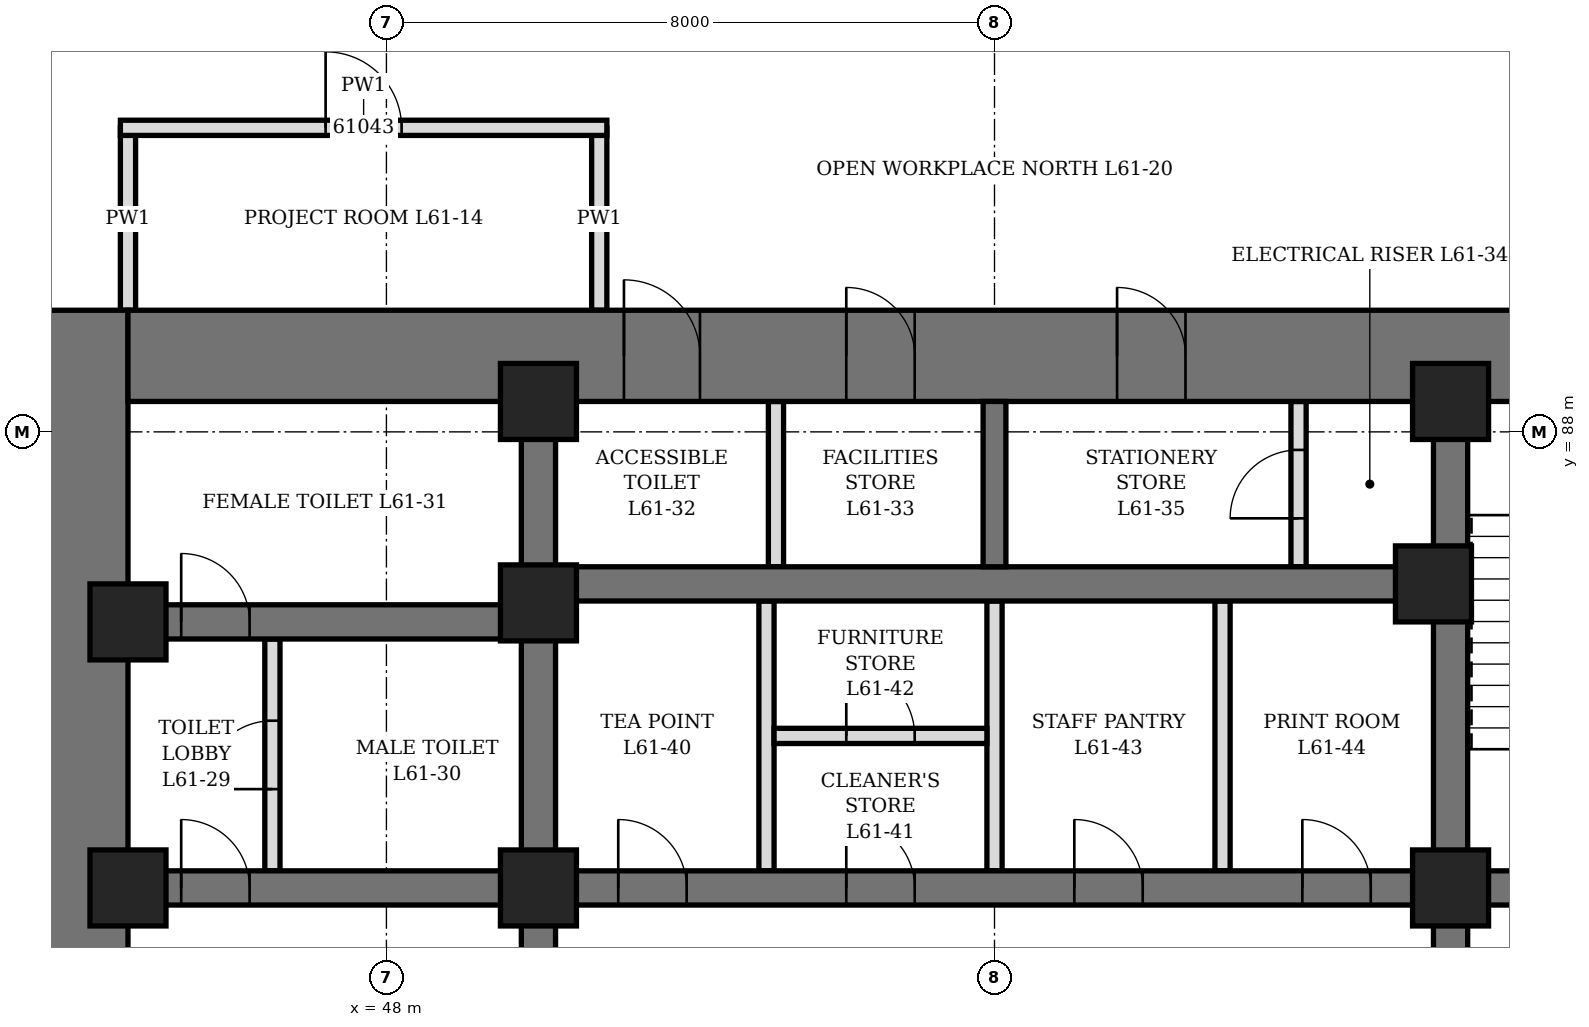
"""IFC4 building model, lengths in metres.
Left out: names, types, materials, properties, quantities, classifications, styles, units other than length and angle.
Written with IfcOpenShell. Run it as: python <this file> out.ifc"""

import sys

from ifc_helpers import new_model, si_unit, direction, frame, frame_2d, origin, origin_2d, place, context, subcontext, project, spatial, rectangle, hollow_rectangle, extrude, element, fill, save


model = new_model("IFC4")
c1 = context("Model", 3, precision=1e-05, world=origin(), true_north=direction((0.0, 1.0)))
c2 = subcontext(c1, "Body", "Model", "MODEL_VIEW")
j1 = project(units=[si_unit("LENGTHUNIT", "METRE"), si_unit("PLANEANGLEUNIT", "RADIAN")], contexts=[c1])
p1 = place(None, origin())
s1 = spatial("IfcSite", under=j1, at=p1, CompositionType="ELEMENT")
p2 = place(p1, origin())
s2 = spatial("IfcBuilding", under=s1, at=p2, CompositionType="ELEMENT")
p3 = place(p2, frame((0.0, 0.0, 271.3)))
s3 = spatial("IfcBuildingStorey", under=s2, at=p3, CompositionType="ELEMENT", Elevation=271.3)
p4 = place(p3, frame((44.0, 70.4, 0.0), z_axis=(0.0, 0.0, 1.0), x_axis=(0.0, 1.0, 0.0)))
e1 = element("IfcWall", 1, at=p4, inside=s3, PredefinedType="SHEAR", context=c2, shape_type="SweptSolid", body=[
    extrude(rectangle(XDim=19.2, YDim=1.2, at=frame_2d((9.6, 0.0))), origin(), (0.0, 0.0, 1.0), 4.2),
])
p5 = place(p4, frame((8.6, 0.0, 0.0)))
e2 = element("IfcOpeningElement", 2, at=p5, cuts=e1, PredefinedType="OPENING", context=c2, shape_type="SweptSolid", body=[
    extrude(rectangle(XDim=2.0, YDim=2.4, at=frame_2d((1.0, 1.2))), frame((0.0, 0.61, 0.0), z_axis=(0.0, -1.0, 0.0), x_axis=(1.0, 0.0, 0.0)), (0.0, 0.0, 1.0), 1.22),
])
p6 = place(p3, frame((44.6, 89.0, 0.0), z_axis=(0.0, 0.0, 1.0), x_axis=(1.0, 0.0, 0.0)))
e3 = element("IfcWall", 3, at=p6, inside=s3, PredefinedType="SHEAR", context=c2, shape_type="SweptSolid", body=[
    extrude(rectangle(XDim=22.8, YDim=1.2, at=frame_2d((11.4, 0.0))), origin(), (0.0, 0.0, 1.0), 4.2),
])
p7 = place(p6, frame((6.525, 0.0, 0.0)))
e4 = element("IfcOpeningElement", 4, at=p7, cuts=e3, PredefinedType="OPENING", context=c2, shape_type="SweptSolid", body=[
    extrude(rectangle(XDim=1.0, YDim=2.1, at=frame_2d((0.5, 1.05))), frame((0.0, 0.61, 0.0), z_axis=(0.0, -1.0, 0.0), x_axis=(1.0, 0.0, 0.0)), (0.0, 0.0, 1.0), 1.22),
])
p8 = place(p6, frame((9.45, 0.0, 0.0)))
e5 = element("IfcOpeningElement", 5, at=p8, cuts=e3, PredefinedType="OPENING", context=c2, shape_type="SweptSolid", body=[
    extrude(rectangle(XDim=0.9, YDim=2.1, at=frame_2d((0.45, 1.05))), frame((0.0, 0.61, 0.0), z_axis=(0.0, -1.0, 0.0), x_axis=(1.0, 0.0, 0.0)), (0.0, 0.0, 1.0), 1.22),
])
p9 = place(p6, frame((13.012, 0.0, 0.0)))
e6 = element("IfcOpeningElement", 6, at=p9, cuts=e3, PredefinedType="OPENING", context=c2, shape_type="SweptSolid", body=[
    extrude(rectangle(XDim=0.9, YDim=2.1, at=frame_2d((0.45, 1.05))), frame((0.0, 0.61, 0.0), z_axis=(0.0, -1.0, 0.0), x_axis=(1.0, 0.0, 0.0)), (0.0, 0.0, 1.0), 1.22),
])
p10 = place(p3, frame((50.0, 71.6, 0.0), z_axis=(0.0, 0.0, 1.0), x_axis=(0.0, 1.0, 0.0)))
e7 = element("IfcWall", 7, at=p10, inside=s3, PredefinedType="SHEAR", context=c2, shape_type="SweptSolid", body=[
    extrude(rectangle(XDim=16.8, YDim=0.45, at=frame_2d((8.4, 0.0))), origin(), (0.0, 0.0, 1.0), 4.2),
])
p11 = place(p10, frame((7.5, 0.0, 0.0)))
e8 = element("IfcOpeningElement", 8, at=p11, cuts=e7, PredefinedType="OPENING", context=c2, shape_type="SweptSolid", body=[
    extrude(rectangle(XDim=1.8, YDim=2.4, at=frame_2d((0.9, 1.2))), frame((0.0, 0.235, 0.0), z_axis=(0.0, -1.0, 0.0), x_axis=(1.0, 0.0, 0.0)), (0.0, 0.0, 1.0), 0.47),
])
p12 = place(p3, frame((62.0, 71.6, 0.0), z_axis=(0.0, 0.0, 1.0), x_axis=(0.0, 1.0, 0.0)))
e9 = element("IfcWall", 9, at=p12, inside=s3, PredefinedType="SHEAR", context=c2, shape_type="SweptSolid", body=[
    extrude(rectangle(XDim=16.8, YDim=0.45, at=frame_2d((8.4, 0.0))), origin(), (0.0, 0.0, 1.0), 4.2),
])
p13 = place(p12, frame((7.5, 0.0, 0.0)))
e10 = element("IfcOpeningElement", 10, at=p13, cuts=e9, PredefinedType="OPENING", context=c2, shape_type="SweptSolid", body=[
    extrude(rectangle(XDim=1.8, YDim=2.4, at=frame_2d((0.9, 1.2))), frame((0.0, 0.235, 0.0), z_axis=(0.0, -1.0, 0.0), x_axis=(1.0, 0.0, 0.0)), (0.0, 0.0, 1.0), 0.47),
])
p14 = place(p3, frame((44.6, 82.0, 0.0), z_axis=(0.0, 0.0, 1.0), x_axis=(1.0, 0.0, 0.0)))
e11 = element("IfcWall", 11, at=p14, inside=s3, PredefinedType="SHEAR", context=c2, shape_type="SweptSolid", body=[
    extrude(rectangle(XDim=5.175, YDim=0.45, at=frame_2d((2.587, 0.0))), origin(), (0.0, 0.0, 1.0), 4.2),
])
p15 = place(p14, frame((0.7, 0.0, 0.0)))
e12 = element("IfcOpeningElement", 12, at=p15, cuts=e11, PredefinedType="OPENING", context=c2, shape_type="SweptSolid", body=[
    extrude(rectangle(XDim=0.9, YDim=2.1, at=frame_2d((0.45, 1.05))), frame((0.0, 0.235, 0.0), z_axis=(0.0, -1.0, 0.0), x_axis=(1.0, 0.0, 0.0)), (0.0, 0.0, 1.0), 0.47),
])
p16 = place(p3, frame((44.6, 85.5, 0.0), z_axis=(0.0, 0.0, 1.0), x_axis=(1.0, 0.0, 0.0)))
e13 = element("IfcWall", 13, at=p16, inside=s3, PredefinedType="SHEAR", context=c2, shape_type="SweptSolid", body=[
    extrude(rectangle(XDim=5.175, YDim=0.45, at=frame_2d((2.587, 0.0))), origin(), (0.0, 0.0, 1.0), 4.2),
])
p17 = place(p16, frame((0.7, 0.0, 0.0)))
e14 = element("IfcOpeningElement", 14, at=p17, cuts=e13, PredefinedType="OPENING", context=c2, shape_type="SweptSolid", body=[
    extrude(rectangle(XDim=0.9, YDim=2.1, at=frame_2d((0.45, 1.05))), frame((0.0, 0.235, 0.0), z_axis=(0.0, -1.0, 0.0), x_axis=(1.0, 0.0, 0.0)), (0.0, 0.0, 1.0), 0.47),
])
p18 = place(p3, frame((62.225, 82.0, 0.0), z_axis=(0.0, 0.0, 1.0), x_axis=(1.0, 0.0, 0.0)))
e15 = element("IfcWall", 15, at=p18, inside=s3, PredefinedType="SHEAR", context=c2, shape_type="SweptSolid", body=[
    extrude(rectangle(XDim=5.175, YDim=0.45, at=frame_2d((2.587, 0.0))), origin(), (0.0, 0.0, 1.0), 4.2),
])
p19 = place(p18, frame((2.175, 0.0, 0.0)))
e16 = element("IfcOpeningElement", 16, at=p19, cuts=e15, PredefinedType="OPENING", context=c2, shape_type="SweptSolid", body=[
    extrude(rectangle(XDim=1.2, YDim=2.1, at=frame_2d((0.6, 1.05))), frame((0.0, 0.235, 0.0), z_axis=(0.0, -1.0, 0.0), x_axis=(1.0, 0.0, 0.0)), (0.0, 0.0, 1.0), 0.47),
])
p20 = place(p3, frame((50.225, 82.0, 0.0), z_axis=(0.0, 0.0, 1.0), x_axis=(1.0, 0.0, 0.0)))
e17 = element("IfcWall", 17, at=p20, inside=s3, PredefinedType="SHEAR", context=c2, shape_type="SweptSolid", body=[
    extrude(rectangle(XDim=11.55, YDim=0.45, at=frame_2d((5.775, 0.0))), origin(), (0.0, 0.0, 1.0), 4.2),
])
p21 = place(p20, frame((0.825, 0.0, 0.0)))
e18 = element("IfcOpeningElement", 18, at=p21, cuts=e17, PredefinedType="OPENING", context=c2, shape_type="SweptSolid", body=[
    extrude(rectangle(XDim=0.9, YDim=2.1, at=frame_2d((0.45, 1.05))), frame((0.0, 0.235, 0.0), z_axis=(0.0, -1.0, 0.0), x_axis=(1.0, 0.0, 0.0)), (0.0, 0.0, 1.0), 0.47),
])
p22 = place(p20, frame((3.825, 0.0, 0.0)))
e19 = element("IfcOpeningElement", 19, at=p22, cuts=e17, PredefinedType="OPENING", context=c2, shape_type="SweptSolid", body=[
    extrude(rectangle(XDim=0.9, YDim=2.1, at=frame_2d((0.45, 1.05))), frame((0.0, 0.235, 0.0), z_axis=(0.0, -1.0, 0.0), x_axis=(1.0, 0.0, 0.0)), (0.0, 0.0, 1.0), 0.47),
])
p23 = place(p20, frame((6.825, 0.0, 0.0)))
e20 = element("IfcOpeningElement", 20, at=p23, cuts=e17, PredefinedType="OPENING", context=c2, shape_type="SweptSolid", body=[
    extrude(rectangle(XDim=0.9, YDim=2.1, at=frame_2d((0.45, 1.05))), frame((0.0, 0.235, 0.0), z_axis=(0.0, -1.0, 0.0), x_axis=(1.0, 0.0, 0.0)), (0.0, 0.0, 1.0), 0.47),
])
p24 = place(p20, frame((9.825, 0.0, 0.0)))
e21 = element("IfcOpeningElement", 21, at=p24, cuts=e17, PredefinedType="OPENING", context=c2, shape_type="SweptSolid", body=[
    extrude(rectangle(XDim=0.9, YDim=2.1, at=frame_2d((0.45, 1.05))), frame((0.0, 0.235, 0.0), z_axis=(0.0, -1.0, 0.0), x_axis=(1.0, 0.0, 0.0)), (0.0, 0.0, 1.0), 0.47),
])
p25 = place(p3, frame((50.225, 86.0, 0.0), z_axis=(0.0, 0.0, 1.0), x_axis=(1.0, 0.0, 0.0)))
e22 = element("IfcWall", 22, at=p25, inside=s3, PredefinedType="SHEAR", context=c2, shape_type="SweptSolid", body=[
    extrude(rectangle(XDim=11.55, YDim=0.45, at=frame_2d((5.775, 0.0))), origin(), (0.0, 0.0, 1.0), 4.2),
])
p26 = place(p3, frame((56.0, 86.225, 0.0), z_axis=(0.0, 0.0, 1.0), x_axis=(0.0, 1.0, 0.0)))
e23 = element("IfcWall", 23, at=p26, inside=s3, PredefinedType="SHEAR", context=c2, shape_type="SweptSolid", body=[
    extrude(rectangle(XDim=2.175, YDim=0.3, at=frame_2d((1.087, 0.0))), origin(), (0.0, 0.0, 1.0), 4.2),
])
for number, where, z_axis, x_axis in (
    (24, (44.6, 82.0, 0.0), (0.0, 0.0, 1.0), (1.0, 0.0, 0.0)),
    (25, (44.6, 85.5, 0.0), (0.0, 0.0, 1.0), (1.0, 0.0, 0.0)),
    (26, (50.0, 82.0, 0.0), (0.0, 0.0, 1.0), (1.0, 0.0, 0.0)),
    (27, (50.0, 85.75, 0.0), (0.0, 0.0, 1.0), (1.0, 0.0, 0.0)),
    (28, (50.0, 88.4, 0.0), (0.0, 0.0, 1.0), (1.0, 0.0, 0.0)),
    (29, (61.775, 86.0, 0.0), (0.0, 0.0, 1.0), (1.0, 0.0, 0.0)),
    (30, (62.0, 82.0, 0.0), (0.0, 0.0, 1.0), (1.0, 0.0, 0.0)),
    (31, (62.0, 88.4, 0.0), (0.0, 0.0, 1.0), (1.0, 0.0, 0.0)),
):
    element("IfcColumn", number, at=place(p3, frame(where, z_axis=z_axis, x_axis=x_axis)), inside=s3, PredefinedType="COLUMN", context=c2, shape_type="SweptSolid", body=[
        extrude(hollow_rectangle(XDim=1.0, YDim=1.0, WallThickness=0.15, at=origin_2d()), origin(), (0.0, 0.0, 1.0), 4.2),
    ])
p27 = place(p3, frame((46.5, 82.225, 0.0), z_axis=(0.0, 0.0, 1.0), x_axis=(0.0, 1.0, 0.0)))
e32 = element("IfcWall", 32, at=p27, inside=s3, PredefinedType="PARTITIONING", context=c2, shape_type="SweptSolid", body=[
    extrude(rectangle(XDim=3.05, YDim=0.2, at=frame_2d((1.525, 0.0))), origin(), (0.0, 0.0, 1.0), 4.04),
])
p28 = place(p27, frame((1.075, 0.0, 0.0)))
e33 = element("IfcOpeningElement", 33, at=p28, cuts=e32, PredefinedType="OPENING", context=c2, shape_type="SweptSolid", body=[
    extrude(rectangle(XDim=0.9, YDim=2.1, at=frame_2d((0.45, 1.05))), frame((0.0, 0.11, 0.0), z_axis=(0.0, -1.0, 0.0), x_axis=(1.0, 0.0, 0.0)), (0.0, 0.0, 1.0), 0.22),
])
p29 = place(p3, frame((53.125, 86.225, 0.0), z_axis=(0.0, 0.0, 1.0), x_axis=(0.0, 1.0, 0.0)))
e34 = element("IfcWall", 34, at=p29, inside=s3, PredefinedType="PARTITIONING", context=c2, shape_type="SweptSolid", body=[
    extrude(rectangle(XDim=2.175, YDim=0.2, at=frame_2d((1.087, 0.0))), origin(), (0.0, 0.0, 1.0), 4.04),
])
p30 = place(p3, frame((60.0, 86.225, 0.0), z_axis=(0.0, 0.0, 1.0), x_axis=(0.0, 1.0, 0.0)))
e35 = element("IfcWall", 35, at=p30, inside=s3, PredefinedType="PARTITIONING", context=c2, shape_type="SweptSolid", body=[
    extrude(rectangle(XDim=2.175, YDim=0.2, at=frame_2d((1.087, 0.0))), origin(), (0.0, 0.0, 1.0), 4.04),
])
p31 = place(p30, frame((0.637, 0.0, 0.0)))
e36 = element("IfcOpeningElement", 36, at=p31, cuts=e35, PredefinedType="OPENING", context=c2, shape_type="SweptSolid", body=[
    extrude(rectangle(XDim=0.9, YDim=2.1, at=frame_2d((0.45, 1.05))), frame((0.0, 0.11, 0.0), z_axis=(0.0, -1.0, 0.0), x_axis=(1.0, 0.0, 0.0)), (0.0, 0.0, 1.0), 0.22),
])
p32 = place(p3, frame((53.0, 82.225, 0.0), z_axis=(0.0, 0.0, 1.0), x_axis=(0.0, 1.0, 0.0)))
e37 = element("IfcWall", 37, at=p32, inside=s3, PredefinedType="PARTITIONING", context=c2, shape_type="SweptSolid", body=[
    extrude(rectangle(XDim=3.55, YDim=0.2, at=frame_2d((1.775, 0.0))), origin(), (0.0, 0.0, 1.0), 4.04),
])
p33 = place(p3, frame((56.0, 82.225, 0.0), z_axis=(0.0, 0.0, 1.0), x_axis=(0.0, 1.0, 0.0)))
e38 = element("IfcWall", 38, at=p33, inside=s3, PredefinedType="PARTITIONING", context=c2, shape_type="SweptSolid", body=[
    extrude(rectangle(XDim=3.55, YDim=0.2, at=frame_2d((1.775, 0.0))), origin(), (0.0, 0.0, 1.0), 2.54),
])
p34 = place(p3, frame((53.1, 84.0, 0.0), z_axis=(0.0, 0.0, 1.0), x_axis=(1.0, 0.0, 0.0)))
e39 = element("IfcWall", 39, at=p34, inside=s3, PredefinedType="PARTITIONING", context=c2, shape_type="SweptSolid", body=[
    extrude(rectangle(XDim=2.8, YDim=0.2, at=frame_2d((1.4, 0.0))), origin(), (0.0, 0.0, 1.0), 4.04),
])
p35 = place(p34, frame((0.95, 0.0, 0.0)))
e40 = element("IfcOpeningElement", 40, at=p35, cuts=e39, PredefinedType="OPENING", context=c2, shape_type="SweptSolid", body=[
    extrude(rectangle(XDim=0.9, YDim=2.1, at=frame_2d((0.45, 1.05))), frame((0.0, 0.11, 0.0), z_axis=(0.0, -1.0, 0.0), x_axis=(1.0, 0.0, 0.0)), (0.0, 0.0, 1.0), 0.22),
])
p36 = place(p3, frame((59.0, 82.225, 0.0), z_axis=(0.0, 0.0, 1.0), x_axis=(0.0, 1.0, 0.0)))
e41 = element("IfcWall", 41, at=p36, inside=s3, PredefinedType="PARTITIONING", context=c2, shape_type="SweptSolid", body=[
    extrude(rectangle(XDim=3.55, YDim=0.2, at=frame_2d((1.775, 0.0))), origin(), (0.0, 0.0, 1.0), 4.04),
])
for number, where, z_axis, x_axis in (
    (42, (44.6, 89.6, 0.0), (0.0, 0.0, 1.0), (0.0, 1.0, 0.0)),
    (43, (50.8, 89.6, 0.0), (0.0, 0.0, 1.0), (0.0, 1.0, 0.0)),
):
    element("IfcWall", number, at=place(p3, frame(where, z_axis=z_axis, x_axis=x_axis)), inside=s3, PredefinedType="PARTITIONING", context=c2, shape_type="SweptSolid", body=[
        extrude(rectangle(XDim=2.4, YDim=0.2, at=frame_2d((1.2, 0.0))), origin(), (0.0, 0.0, 1.0), 4.04),
    ])
p37 = place(p3, frame((44.5, 92.0, 0.0), z_axis=(0.0, 0.0, 1.0), x_axis=(1.0, 0.0, 0.0)))
e44 = element("IfcWall", 44, at=p37, inside=s3, PredefinedType="PARTITIONING", context=c2, shape_type="SweptSolid", body=[
    extrude(rectangle(XDim=6.4, YDim=0.2, at=frame_2d((3.2, 0.0))), origin(), (0.0, 0.0, 1.0), 4.04),
])
p38 = place(p37, frame((2.7, 0.0, 0.0)))
e45 = element("IfcOpeningElement", 45, at=p38, cuts=e44, PredefinedType="OPENING", context=c2, shape_type="SweptSolid", body=[
    extrude(rectangle(XDim=1.0, YDim=2.1, at=frame_2d((0.5, 1.05))), frame((0.0, 0.11, 0.0), z_axis=(0.0, -1.0, 0.0), x_axis=(1.0, 0.0, 0.0)), (0.0, 0.0, 1.0), 0.22),
])
p39 = place(p15, origin())
e46 = element("IfcDoor", 46, at=p39, inside=s3, OperationType="SINGLE_SWING_LEFT", PredefinedType="DOOR", context=c2, shape_type="SweptSolid", body=[
    extrude(rectangle(XDim=0.9, YDim=2.1, at=frame_2d((0.45, 1.05))), frame((0.0, 0.225, 0.0), z_axis=(0.0, -1.0, 0.0), x_axis=(1.0, 0.0, 0.0)), (0.0, 0.0, 1.0), 0.449),
])
fill(e12, e46)
p40 = place(p28, origin())
e47 = element("IfcDoor", 47, at=p40, inside=s3, OperationType="SINGLE_SWING_RIGHT", PredefinedType="DOOR", context=c2, shape_type="SweptSolid", body=[
    extrude(rectangle(XDim=0.9, YDim=2.1, at=frame_2d((0.45, 1.05))), frame((0.0, 0.1, 0.0), z_axis=(0.0, -1.0, 0.0), x_axis=(1.0, 0.0, 0.0)), (0.0, 0.0, 1.0), 0.199),
])
fill(e33, e47)
p41 = place(p17, origin())
e48 = element("IfcDoor", 48, at=p41, inside=s3, OperationType="SINGLE_SWING_RIGHT", PredefinedType="DOOR", context=c2, shape_type="SweptSolid", body=[
    extrude(rectangle(XDim=0.9, YDim=2.1, at=frame_2d((0.45, 1.05))), frame((0.0, 0.225, 0.0), z_axis=(0.0, -1.0, 0.0), x_axis=(1.0, 0.0, 0.0)), (0.0, 0.0, 1.0), 0.449),
])
fill(e14, e48)
p42 = place(p7, origin())
e49 = element("IfcDoor", 49, at=p42, inside=s3, OperationType="SINGLE_SWING_LEFT", PredefinedType="DOOR", context=c2, shape_type="SweptSolid", body=[
    extrude(rectangle(XDim=1.0, YDim=2.1, at=frame_2d((0.5, 1.05))), frame((0.0, 0.35, 0.0), z_axis=(0.0, -1.0, 0.0), x_axis=(1.0, 0.0, 0.0)), (0.0, 0.0, 1.0), 0.7),
])
fill(e4, e49)
p43 = place(p8, origin())
e50 = element("IfcDoor", 50, at=p43, inside=s3, OperationType="SINGLE_SWING_LEFT", PredefinedType="DOOR", context=c2, shape_type="SweptSolid", body=[
    extrude(rectangle(XDim=0.9, YDim=2.1, at=frame_2d((0.45, 1.05))), frame((0.0, 0.35, 0.0), z_axis=(0.0, -1.0, 0.0), x_axis=(1.0, 0.0, 0.0)), (0.0, 0.0, 1.0), 0.7),
])
fill(e5, e50)
p44 = place(p9, origin())
e51 = element("IfcDoor", 51, at=p44, inside=s3, OperationType="SINGLE_SWING_LEFT", PredefinedType="DOOR", context=c2, shape_type="SweptSolid", body=[
    extrude(rectangle(XDim=0.9, YDim=2.1, at=frame_2d((0.45, 1.05))), frame((0.0, 0.35, 0.0), z_axis=(0.0, -1.0, 0.0), x_axis=(1.0, 0.0, 0.0)), (0.0, 0.0, 1.0), 0.7),
])
fill(e6, e51)
p45 = place(p31, origin())
e52 = element("IfcDoor", 52, at=p45, inside=s3, OperationType="SINGLE_SWING_LEFT", PredefinedType="DOOR", context=c2, shape_type="SweptSolid", body=[
    extrude(rectangle(XDim=0.9, YDim=2.1, at=frame_2d((0.45, 1.05))), frame((0.0, 0.1, 0.0), z_axis=(0.0, -1.0, 0.0), x_axis=(1.0, 0.0, 0.0)), (0.0, 0.0, 1.0), 0.199),
])
fill(e36, e52)
p46 = place(p21, origin())
e53 = element("IfcDoor", 53, at=p46, inside=s3, OperationType="SINGLE_SWING_LEFT", PredefinedType="DOOR", context=c2, shape_type="SweptSolid", body=[
    extrude(rectangle(XDim=0.9, YDim=2.1, at=frame_2d((0.45, 1.05))), frame((0.0, 0.225, 0.0), z_axis=(0.0, -1.0, 0.0), x_axis=(1.0, 0.0, 0.0)), (0.0, 0.0, 1.0), 0.449),
])
fill(e18, e53)
p47 = place(p22, origin())
e54 = element("IfcDoor", 54, at=p47, inside=s3, OperationType="SINGLE_SWING_LEFT", PredefinedType="DOOR", context=c2, shape_type="SweptSolid", body=[
    extrude(rectangle(XDim=0.9, YDim=2.1, at=frame_2d((0.45, 1.05))), frame((0.0, 0.225, 0.0), z_axis=(0.0, -1.0, 0.0), x_axis=(1.0, 0.0, 0.0)), (0.0, 0.0, 1.0), 0.449),
])
fill(e19, e54)
p48 = place(p35, origin())
e55 = element("IfcDoor", 55, at=p48, inside=s3, OperationType="SINGLE_SWING_LEFT", PredefinedType="DOOR", context=c2, shape_type="SweptSolid", body=[
    extrude(rectangle(XDim=0.9, YDim=2.1, at=frame_2d((0.45, 1.05))), frame((0.0, 0.1, 0.0), z_axis=(0.0, -1.0, 0.0), x_axis=(1.0, 0.0, 0.0)), (0.0, 0.0, 1.0), 0.199),
])
fill(e40, e55)
p49 = place(p23, origin())
e56 = element("IfcDoor", 56, at=p49, inside=s3, OperationType="SINGLE_SWING_LEFT", PredefinedType="DOOR", context=c2, shape_type="SweptSolid", body=[
    extrude(rectangle(XDim=0.9, YDim=2.1, at=frame_2d((0.45, 1.05))), frame((0.0, 0.225, 0.0), z_axis=(0.0, -1.0, 0.0), x_axis=(1.0, 0.0, 0.0)), (0.0, 0.0, 1.0), 0.449),
])
fill(e20, e56)
p50 = place(p24, origin())
e57 = element("IfcDoor", 57, at=p50, inside=s3, OperationType="SINGLE_SWING_LEFT", PredefinedType="DOOR", context=c2, shape_type="SweptSolid", body=[
    extrude(rectangle(XDim=0.9, YDim=2.1, at=frame_2d((0.45, 1.05))), frame((0.0, 0.225, 0.0), z_axis=(0.0, -1.0, 0.0), x_axis=(1.0, 0.0, 0.0)), (0.0, 0.0, 1.0), 0.449),
])
fill(e21, e57)
p51 = place(p38, origin())
e58 = element("IfcDoor", 58, at=p51, inside=s3, OperationType="SINGLE_SWING_LEFT", PredefinedType="DOOR", context=c2, shape_type="SweptSolid", body=[
    extrude(rectangle(XDim=1.0, YDim=2.1, at=frame_2d((0.5, 1.05))), frame((0.0, 0.1, 0.0), z_axis=(0.0, -1.0, 0.0), x_axis=(1.0, 0.0, 0.0)), (0.0, 0.0, 1.0), 0.199),
])
fill(e45, e58)
save(model, sys.argv[1])
